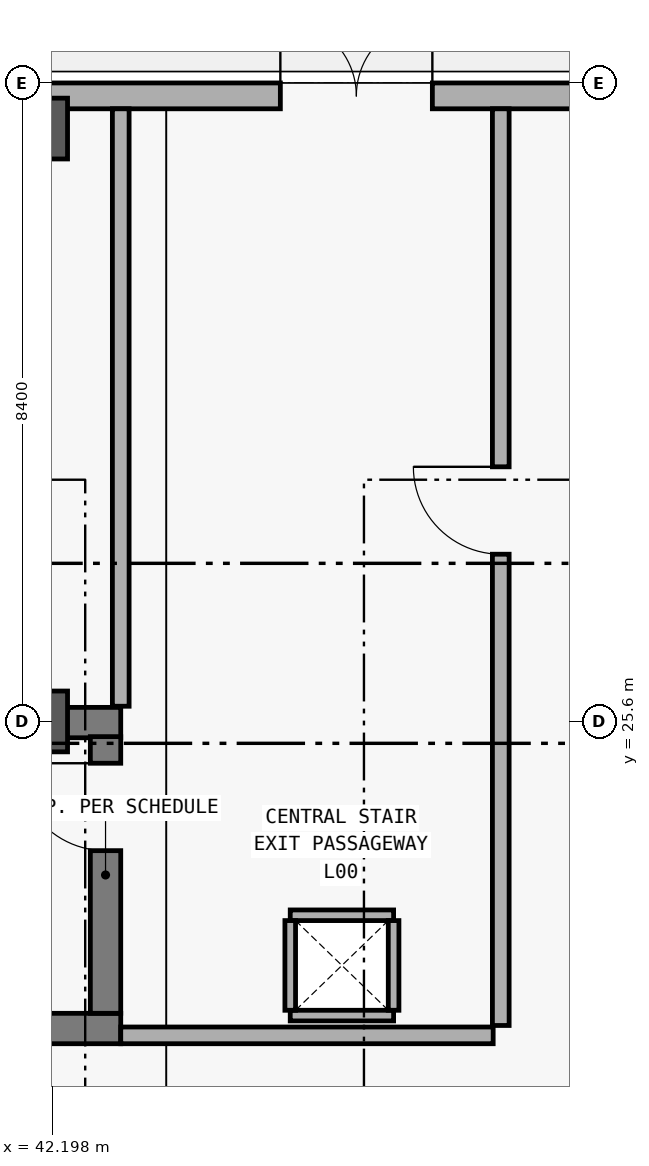
"""IFC4 building model, lengths in metres.
Left out: names, types, materials, properties, quantities, classifications, styles, units other than length and angle.
Written with IfcOpenShell. Run it as: python <this file> out.ifc"""

import sys

from ifc_helpers import new_model, si_unit, direction, frame, frame_2d, origin, origin_2d, place, context, subcontext, project, spatial, rectangle, extrude, element, fill, save


model = new_model("IFC4")
c1 = context("Model", 3, precision=1e-05, world=origin(), true_north=direction((0.0, 1.0)))
c2 = subcontext(c1, "Body", "Model", "MODEL_VIEW")
j1 = project(units=[si_unit("LENGTHUNIT", "METRE"), si_unit("PLANEANGLEUNIT", "RADIAN")], contexts=[c1])
p1 = place(None, origin())
s1 = spatial("IfcSite", under=j1, at=p1, CompositionType="ELEMENT")
p2 = place(p1, origin())
s2 = spatial("IfcBuilding", under=s1, at=p2, CompositionType="ELEMENT")
p3 = place(p2, origin())
s3 = spatial("IfcBuildingStorey", under=s2, at=p3, CompositionType="ELEMENT", Elevation=0.0)
for number, where, z_axis, x_axis in (
    (1, (42.0, 25.6, 0.0), (0.0, 0.0, 1.0), (1.0, 0.0, 0.0)),
    (2, (42.0, 33.4, 0.0), (0.0, 0.0, 1.0), (1.0, 0.0, 0.0)),
):
    element("IfcColumn", number, at=place(p3, frame(where, z_axis=z_axis, x_axis=x_axis)), inside=s3, PredefinedType="COLUMN", context=c2, shape_type="SweptSolid", body=[
        extrude(rectangle(XDim=0.8, YDim=0.8, at=origin_2d()), origin(), (0.0, 0.0, 1.0), 5.4),
    ])
p4 = place(p3, frame((42.0, 33.83, 0.0), z_axis=(0.0, 0.0, 1.0), x_axis=(1.0, 0.0, 0.0)))
e3 = element("IfcWall", 3, at=p4, inside=s3, PredefinedType="SOLIDWALL", context=c2, shape_type="SweptSolid", body=[
    extrude(rectangle(XDim=8.4, YDim=0.34, at=frame_2d((4.2, 0.0))), origin(), (0.0, 0.0, 1.0), 5.1),
])
p5 = place(p4, frame((3.2, 0.0, 0.0)))
e4 = element("IfcOpeningElement", 4, at=p5, cuts=e3, PredefinedType="OPENING", context=c2, shape_type="SweptSolid", body=[
    extrude(rectangle(XDim=2.0, YDim=2.6, at=frame_2d((1.0, 1.3))), frame((0.0, 0.18, 0.0), z_axis=(0.0, -1.0, 0.0), x_axis=(1.0, 0.0, 0.0)), (0.0, 0.0, 1.0), 0.36),
])
for number, where, z_axis, x_axis in (
    (5, (34.0, 21.56, 0.0), (0.0, 0.0, 1.0), (1.0, 0.0, 0.0)),
    (6, (43.1, 25.585, 0.0), (0.0, 0.0, 1.0), (-1.0, 0.0, 0.0)),
):
    element("IfcWall", number, at=place(p3, frame(where, z_axis=z_axis, x_axis=x_axis)), inside=s3, PredefinedType="SHEAR", context=c2, shape_type="SweptSolid", body=[
        extrude(rectangle(XDim=9.1, YDim=0.4, at=frame_2d((4.55, 0.0))), origin(), (0.0, 0.0, 1.0), 5.08),
    ])
p6 = place(p3, frame((42.9, 21.76, 0.0), z_axis=(0.0, 0.0, 1.0), x_axis=(0.0, 1.0, 0.0)))
e7 = element("IfcWall", 7, at=p6, inside=s3, PredefinedType="SHEAR", context=c2, shape_type="SweptSolid", body=[
    extrude(rectangle(XDim=3.64, YDim=0.4, at=frame_2d((1.82, 0.0))), origin(), (0.0, 0.0, 1.0), 5.08),
])
p7 = place(p6, frame((2.14, 0.0, 0.0)))
e8 = element("IfcOpeningElement", 8, at=p7, cuts=e7, PredefinedType="OPENING", context=c2, shape_type="SweptSolid", body=[
    extrude(rectangle(XDim=1.15, YDim=2.2, at=frame_2d((0.575, 1.1))), frame((0.0, 0.21, 0.0), z_axis=(0.0, -1.0, 0.0), x_axis=(1.0, 0.0, 0.0)), (0.0, 0.0, 1.0), 0.42),
])
for number, where, z_axis, x_axis in (
    (9, (45.33, 21.73, 0.0), (0.0, 0.0, 1.0), (1.0, 0.0, 0.0)),
    (10, (46.69, 23.05, 0.0), (0.0, 0.0, 1.0), (-1.0, 0.0, 0.0)),
):
    element("IfcWall", number, at=place(p3, frame(where, z_axis=z_axis, x_axis=x_axis)), inside=s3, PredefinedType="PARTITIONING", context=c2, shape_type="SweptSolid", body=[
        extrude(rectangle(XDim=1.36, YDim=0.14, at=frame_2d((0.68, 0.0))), origin(), (0.0, 0.0, 1.0), 4.2),
    ])
for number, where, z_axis, x_axis in (
    (11, (45.33, 22.98, 0.0), (0.0, 0.0, 1.0), (0.0, -1.0, 0.0)),
    (12, (46.69, 21.8, 0.0), (0.0, 0.0, 1.0), (0.0, 1.0, 0.0)),
):
    element("IfcWall", number, at=place(p3, frame(where, z_axis=z_axis, x_axis=x_axis)), inside=s3, PredefinedType="PARTITIONING", context=c2, shape_type="SweptSolid", body=[
        extrude(rectangle(XDim=1.18, YDim=0.14, at=frame_2d((0.59, 0.0))), origin(), (0.0, 0.0, 1.0), 4.2),
    ])
p8 = place(p3, frame((43.1, 25.8, 0.0), z_axis=(0.0, 0.0, 1.0), x_axis=(0.0, 1.0, 0.0)))
e13 = element("IfcWall", 13, at=p8, inside=s3, PredefinedType="SOLIDWALL", context=c2, shape_type="SweptSolid", body=[
    extrude(rectangle(XDim=7.86, YDim=0.22, at=frame_2d((3.93, 0.0))), origin(), (0.0, 0.0, 1.0), 4.2),
])
p9 = place(p3, frame((48.1, 21.6, 0.0), z_axis=(0.0, 0.0, 1.0), x_axis=(0.0, 1.0, 0.0)))
e14 = element("IfcWall", 14, at=p9, inside=s3, PredefinedType="SOLIDWALL", context=c2, shape_type="SweptSolid", body=[
    extrude(rectangle(XDim=12.06, YDim=0.22, at=frame_2d((6.03, 0.0))), origin(), (0.0, 0.0, 1.0), 4.2),
])
p10 = place(p9, frame((6.2, 0.0, 0.0)))
e15 = element("IfcOpeningElement", 15, at=p10, cuts=e14, PredefinedType="OPENING", context=c2, shape_type="SweptSolid", body=[
    extrude(rectangle(XDim=1.15, YDim=2.2, at=frame_2d((0.575, 1.1))), frame((0.0, 0.12, 0.0), z_axis=(0.0, -1.0, 0.0), x_axis=(1.0, 0.0, 0.0)), (0.0, 0.0, 1.0), 0.24),
])
p11 = place(p3, frame((43.1, 21.47, 0.0), z_axis=(0.0, 0.0, 1.0), x_axis=(1.0, 0.0, 0.0)))
e16 = element("IfcWall", 16, at=p11, inside=s3, PredefinedType="SOLIDWALL", context=c2, shape_type="SweptSolid", body=[
    extrude(rectangle(XDim=4.9, YDim=0.22, at=frame_2d((2.45, 0.0))), origin(), (0.0, 0.0, 1.0), 4.2),
])
p12 = place(p5, origin())
e17 = element("IfcDoor", 17, at=p12, inside=s3, OperationType="DOUBLE_DOOR_SINGLE_SWING", PredefinedType="DOOR", context=c2, shape_type="SweptSolid", body=[
    extrude(rectangle(XDim=2.0, YDim=2.6, at=frame_2d((1.0, 1.3))), frame((0.0, 0.025, 0.0), z_axis=(0.0, -1.0, 0.0), x_axis=(1.0, 0.0, 0.0)), (0.0, 0.0, 1.0), 0.05),
])
fill(e4, e17)
p13 = place(p7, origin())
e18 = element("IfcDoor", 18, at=p13, inside=s3, OperationType="SINGLE_SWING_RIGHT", PredefinedType="DOOR", context=c2, shape_type="SweptSolid", body=[
    extrude(rectangle(XDim=1.15, YDim=2.2, at=frame_2d((0.575, 1.1))), frame((0.0, 0.025, 0.0), z_axis=(0.0, -1.0, 0.0), x_axis=(1.0, 0.0, 0.0)), (0.0, 0.0, 1.0), 0.05),
])
fill(e8, e18)
p14 = place(p10, origin())
e19 = element("IfcDoor", 19, at=p14, inside=s3, OperationType="SINGLE_SWING_RIGHT", PredefinedType="DOOR", context=c2, shape_type="SweptSolid", body=[
    extrude(rectangle(XDim=1.15, YDim=2.2, at=frame_2d((0.575, 1.1))), frame((0.0, 0.025, 0.0), z_axis=(0.0, -1.0, 0.0), x_axis=(1.0, 0.0, 0.0)), (0.0, 0.0, 1.0), 0.05),
])
fill(e15, e19)
save(model, sys.argv[1])
